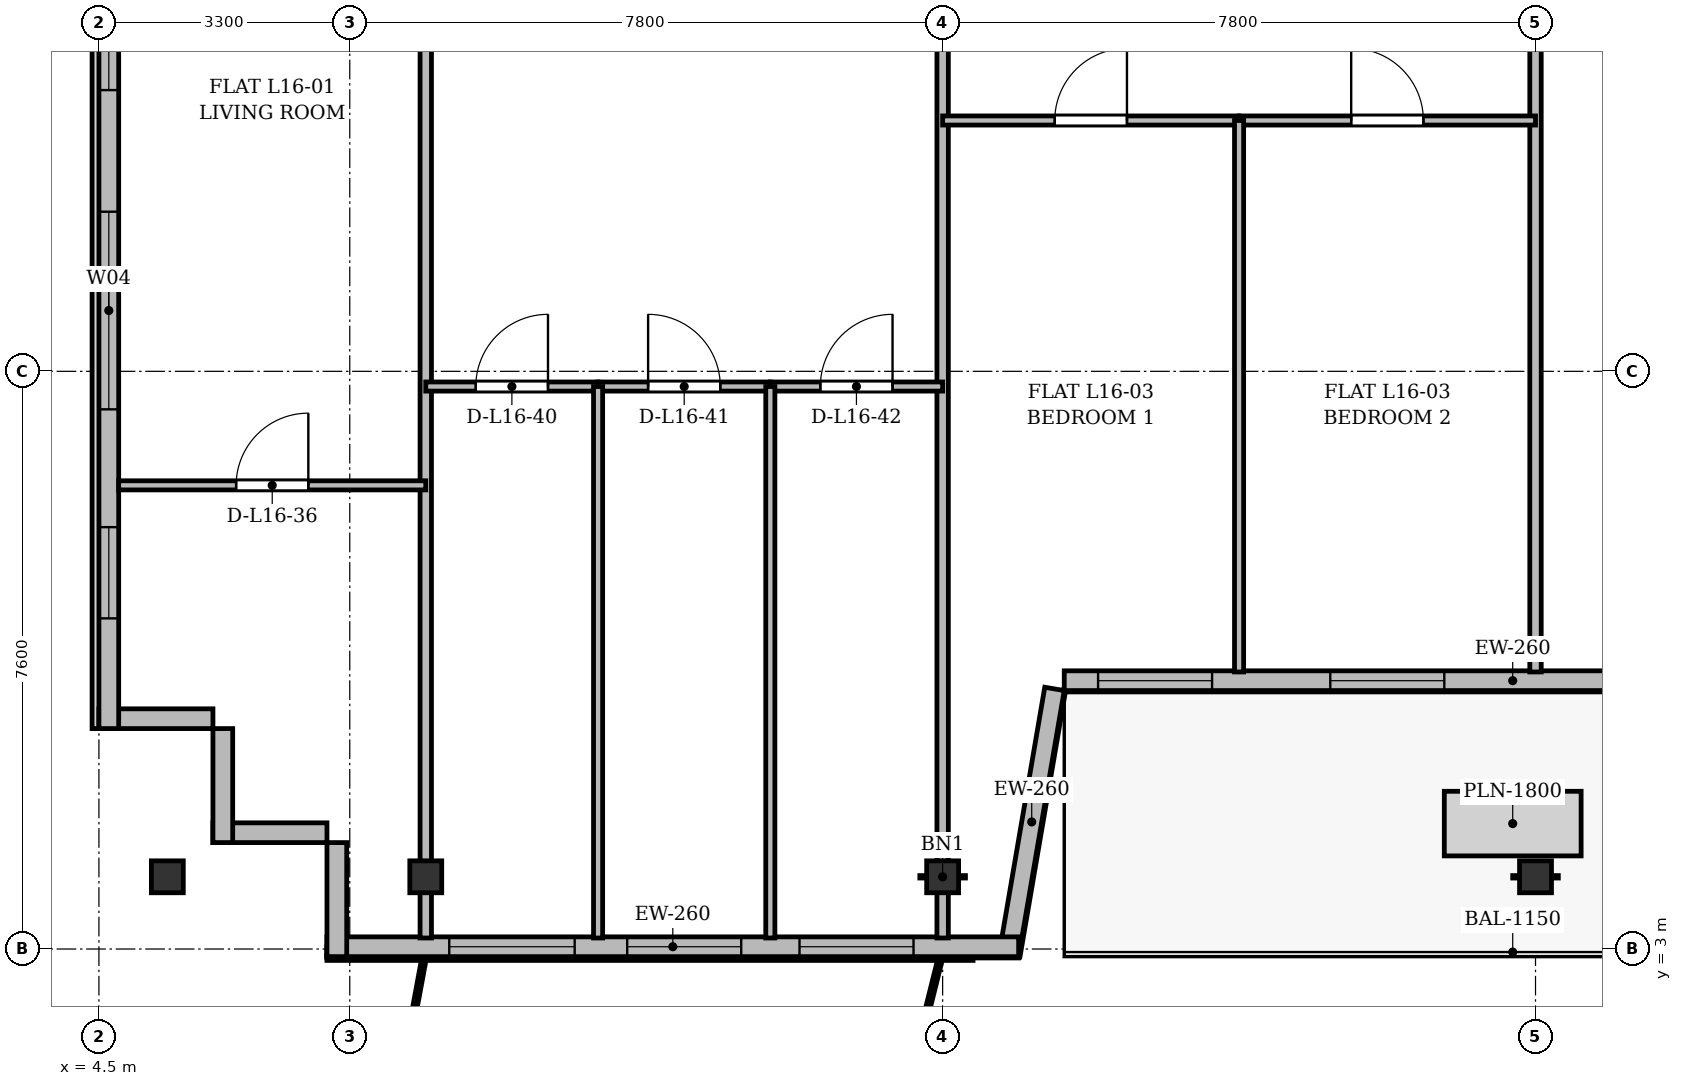
"""IFC4 building model, lengths in metres.
Left out: names, types, materials, properties, quantities, classifications, styles, units other than length and angle.
Written with IfcOpenShell. Run it as: python <this file> out.ifc"""

import sys

from ifc_helpers import new_model, si_unit, direction, frame, frame_2d, origin, origin_2d, place, context, subcontext, project, spatial, rectangle, i_section, extrude, source, transform, mapped, element, fill, save


model = new_model("IFC4")
c1 = context("Model", 3, precision=1e-05, world=origin(), true_north=direction((0.0, 1.0)))
c2 = subcontext(c1, "Body", "Model", "MODEL_VIEW")
j1 = project(units=[si_unit("LENGTHUNIT", "METRE"), si_unit("PLANEANGLEUNIT", "RADIAN")], contexts=[c1])
p1 = place(None, origin())
s1 = spatial("IfcSite", under=j1, at=p1, CompositionType="ELEMENT")
p2 = place(p1, origin())
s2 = spatial("IfcBuilding", under=s1, at=p2, CompositionType="ELEMENT")
p3 = place(p2, frame((0.0, 0.0, 63.1)))
s3 = spatial("IfcBuildingStorey", under=s2, at=p3, CompositionType="ELEMENT", Elevation=63.1)
m1 = source(origin(), c2, "Body", "SweptSolid", [
    extrude(i_section(OverallWidth=0.42, OverallDepth=0.42, WebThickness=0.026, FlangeThickness=0.04, at=origin_2d()), origin(), (0.0, 0.0, 1.0), 3.6),
])
for number, where, z_axis, x_axis in (
    (1, (5.4, 3.95, 0.0), (0.0, 0.0, 1.0), (1.0, 0.0, 0.0)),
    (2, (8.8, 3.95, 0.0), (0.0, 0.0, 1.0), (1.0, 0.0, 0.0)),
    (3, (15.6, 3.95, 0.0), (0.0, 0.0, 1.0), (1.0, 0.0, 0.0)),
    (4, (23.4, 3.95, 0.0), (0.0, 0.0, 1.0), (1.0, 0.0, 0.0)),
):
    element("IfcColumn", number, at=place(p3, frame(where, z_axis=z_axis, x_axis=x_axis)), inside=s3, PredefinedType="COLUMN", context=c2, shape_type="MappedRepresentation", body=[
        mapped(m1, transform((0.0, 0.0, 0.0), x_axis=(1.0, 0.0, 0.0), y_axis=(0.0, 1.0, 0.0), z_axis=(0.0, 0.0, 1.0), scale=1.0)),
    ])
for number, where, z_axis, x_axis in (
    (5, (7.5, 4.53, 0.0), (0.0, 0.0, 1.0), (-1.0, 0.0, 0.0)),
    (6, (6.13, 4.4, 0.0), (0.0, 0.0, 1.0), (0.0, 1.0, 0.0)),
):
    element("IfcWall", number, at=place(p3, frame(where, z_axis=z_axis, x_axis=x_axis)), inside=s3, PredefinedType="SOLIDWALL", context=c2, shape_type="SweptSolid", body=[
        extrude(rectangle(XDim=1.5, YDim=0.26, at=frame_2d((0.75, 0.0))), origin(), (0.0, 0.0, 1.0), 3.34),
    ])
p4 = place(p3, frame((6.0, 6.03, 0.0), z_axis=(0.0, 0.0, 1.0), x_axis=(-1.0, 0.0, 0.0)))
e7 = element("IfcWall", 7, at=p4, inside=s3, PredefinedType="SOLIDWALL", context=c2, shape_type="SweptSolid", body=[
    extrude(rectangle(XDim=1.5, YDim=0.26, at=frame_2d((0.75, 0.0))), origin(), (0.0, 0.0, 1.0), 2.752),
])
p5 = place(p3, frame((4.63, 5.9, 0.0), z_axis=(0.0, 0.0, 1.0), x_axis=(0.0, 1.0, 0.0)))
e8 = element("IfcWall", 8, at=p5, inside=s3, PredefinedType="SOLIDWALL", context=c2, shape_type="SweptSolid", body=[
    extrude(rectangle(XDim=39.6, YDim=0.26, at=frame_2d((19.8, 0.0))), origin(), (0.0, 0.0, 1.0), 3.34),
])
p6 = place(p5, frame((1.45, 0.0, 0.92)))
e9 = element("IfcOpeningElement", 9, at=p6, cuts=e8, PredefinedType="OPENING", context=c2, shape_type="SweptSolid", body=[
    extrude(rectangle(XDim=1.2, YDim=1.65, at=frame_2d((0.6, 0.825))), frame((0.0, 0.14, 0.0), z_axis=(0.0, -1.0, 0.0), x_axis=(1.0, 0.0, 0.0)), (0.0, 0.0, 1.0), 0.28),
])
p7 = place(p5, frame((4.2, 0.0, 0.92)))
e10 = element("IfcOpeningElement", 10, at=p7, cuts=e8, PredefinedType="OPENING", context=c2, shape_type="SweptSolid", body=[
    extrude(rectangle(XDim=2.6, YDim=1.9, at=frame_2d((1.3, 0.95))), frame((0.0, 0.14, 0.0), z_axis=(0.0, -1.0, 0.0), x_axis=(1.0, 0.0, 0.0)), (0.0, 0.0, 1.0), 0.28),
])
p8 = place(p5, frame((8.4, 0.0, 0.92)))
e11 = element("IfcOpeningElement", 11, at=p8, cuts=e8, PredefinedType="OPENING", context=c2, shape_type="SweptSolid", body=[
    extrude(rectangle(XDim=2.6, YDim=1.9, at=frame_2d((1.3, 0.95))), frame((0.0, 0.14, 0.0), z_axis=(0.0, -1.0, 0.0), x_axis=(1.0, 0.0, 0.0)), (0.0, 0.0, 1.0), 0.28),
])
p9 = place(p5, frame((33.9, 0.0, 0.92)))
e12 = element("IfcOpeningElement", 12, at=p9, cuts=e8, PredefinedType="OPENING", context=c2, shape_type="SweptSolid", body=[
    extrude(rectangle(XDim=1.2, YDim=1.65, at=frame_2d((0.6, 0.825))), frame((0.0, 0.14, 0.0), z_axis=(0.0, -1.0, 0.0), x_axis=(1.0, 0.0, 0.0)), (0.0, 0.0, 1.0), 0.28),
])
p10 = place(p5, frame((37.25, 0.0, 0.92)))
e13 = element("IfcOpeningElement", 13, at=p10, cuts=e8, PredefinedType="OPENING", context=c2, shape_type="SweptSolid", body=[
    extrude(rectangle(XDim=1.2, YDim=1.65, at=frame_2d((0.6, 0.825))), frame((0.0, 0.14, 0.0), z_axis=(0.0, -1.0, 0.0), x_axis=(1.0, 0.0, 0.0)), (0.0, 0.0, 1.0), 0.28),
])
p11 = place(p3, frame((29.0, 6.53, 0.0), z_axis=(0.0, 0.0, 1.0), x_axis=(-1.0, 0.0, 0.0)))
e14 = element("IfcWall", 14, at=p11, inside=s3, PredefinedType="SOLIDWALL", context=c2, shape_type="SweptSolid", body=[
    extrude(rectangle(XDim=11.8, YDim=0.26, at=frame_2d((5.9, 0.0))), origin(), (0.0, 0.0, 1.0), 2.752),
])
p12 = place(p11, frame((1.745, 0.0, 0.9)))
e15 = element("IfcOpeningElement", 15, at=p12, cuts=e14, PredefinedType="OPENING", context=c2, shape_type="SweptSolid", body=[
    extrude(rectangle(XDim=2.2, YDim=1.75, at=frame_2d((1.1, 0.875))), frame((0.0, 0.14, 0.0), z_axis=(0.0, -1.0, 0.0), x_axis=(1.0, 0.0, 0.0)), (0.0, 0.0, 1.0), 0.28),
])
p13 = place(p11, frame((6.8, 0.0, 0.9)))
e16 = element("IfcOpeningElement", 16, at=p13, cuts=e14, PredefinedType="OPENING", context=c2, shape_type="SweptSolid", body=[
    extrude(rectangle(XDim=1.5, YDim=1.75, at=frame_2d((0.75, 0.875))), frame((0.0, 0.14, 0.0), z_axis=(0.0, -1.0, 0.0), x_axis=(1.0, 0.0, 0.0)), (0.0, 0.0, 1.0), 0.28),
])
p14 = place(p11, frame((9.855, 0.0, 0.9)))
e17 = element("IfcOpeningElement", 17, at=p14, cuts=e14, PredefinedType="OPENING", context=c2, shape_type="SweptSolid", body=[
    extrude(rectangle(XDim=1.5, YDim=1.75, at=frame_2d((0.75, 0.875))), frame((0.0, 0.14, 0.0), z_axis=(0.0, -1.0, 0.0), x_axis=(1.0, 0.0, 0.0)), (0.0, 0.0, 1.0), 0.28),
])
p15 = place(p3, frame((17.072, 6.422, 0.0), z_axis=(0.0, 0.0, 1.0), x_axis=(-0.168990530437, -0.98561767467, 0.0)))
e18 = element("IfcWall", 18, at=p15, inside=s3, PredefinedType="SOLIDWALL", context=c2, shape_type="SweptSolid", body=[
    extrude(rectangle(XDim=3.551, YDim=0.26, at=frame_2d((1.775, 0.0))), origin(), (0.0, 0.0, 1.0), 2.69),
])
p16 = place(p3, frame((16.6, 3.03, 0.0), z_axis=(0.0, 0.0, 1.0), x_axis=(-1.0, 0.0, 0.0)))
e19 = element("IfcWall", 19, at=p16, inside=s3, PredefinedType="SOLIDWALL", context=c2, shape_type="SweptSolid", body=[
    extrude(rectangle(XDim=9.1, YDim=0.26, at=frame_2d((4.55, 0.0))), origin(), (0.0, 0.0, 1.0), 3.34),
])
p17 = place(p16, frame((1.383, 0.0, 0.9)))
e20 = element("IfcOpeningElement", 20, at=p17, cuts=e19, PredefinedType="OPENING", context=c2, shape_type="SweptSolid", body=[
    extrude(rectangle(XDim=1.5, YDim=1.75, at=frame_2d((0.75, 0.875))), frame((0.0, 0.14, 0.0), z_axis=(0.0, -1.0, 0.0), x_axis=(1.0, 0.0, 0.0)), (0.0, 0.0, 1.0), 0.28),
])
p18 = place(p16, frame((3.65, 0.0, 0.9)))
e21 = element("IfcOpeningElement", 21, at=p18, cuts=e19, PredefinedType="OPENING", context=c2, shape_type="SweptSolid", body=[
    extrude(rectangle(XDim=1.5, YDim=1.75, at=frame_2d((0.75, 0.875))), frame((0.0, 0.14, 0.0), z_axis=(0.0, -1.0, 0.0), x_axis=(1.0, 0.0, 0.0)), (0.0, 0.0, 1.0), 0.28),
])
p19 = place(p16, frame((5.841, 0.0, 0.9)))
e22 = element("IfcOpeningElement", 22, at=p19, cuts=e19, PredefinedType="OPENING", context=c2, shape_type="SweptSolid", body=[
    extrude(rectangle(XDim=1.65, YDim=1.85, at=frame_2d((0.825, 0.925))), frame((0.0, 0.14, 0.0), z_axis=(0.0, -1.0, 0.0), x_axis=(1.0, 0.0, 0.0)), (0.0, 0.0, 1.0), 0.28),
])
p20 = place(p3, frame((7.63, 2.9, 0.0), z_axis=(0.0, 0.0, 1.0), x_axis=(0.0, 1.0, 0.0)))
e23 = element("IfcWall", 23, at=p20, inside=s3, PredefinedType="SOLIDWALL", context=c2, shape_type="SweptSolid", body=[
    extrude(rectangle(XDim=1.5, YDim=0.26, at=frame_2d((0.75, 0.0))), origin(), (0.0, 0.0, 1.0), 2.69),
])
for number, where, z_axis, x_axis in (
    (24, (8.8, 3.145, 0.0), (0.0, 0.0, 1.0), (0.0, 1.0, 0.0)),
    (25, (15.6, 3.145, 0.0), (0.0, 0.0, 1.0), (0.0, 1.0, 0.0)),
):
    element("IfcWall", number, at=place(p3, frame(where, z_axis=z_axis, x_axis=x_axis)), inside=s3, PredefinedType="PARTITIONING", context=c2, shape_type="SweptSolid", body=[
        extrude(rectangle(XDim=24.455, YDim=0.15, at=frame_2d((12.228, 0.0))), origin(), (0.0, 0.0, 1.0), 2.752),
    ])
p21 = place(p3, frame((23.4, 6.645, 0.0), z_axis=(0.0, 0.0, 1.0), x_axis=(0.0, 1.0, 0.0)))
e26 = element("IfcWall", 26, at=p21, inside=s3, PredefinedType="PARTITIONING", context=c2, shape_type="SweptSolid", body=[
    extrude(rectangle(XDim=20.955, YDim=0.15, at=frame_2d((10.478, 0.0))), origin(), (0.0, 0.0, 1.0), 2.752),
])
p22 = place(p3, frame((4.76, 9.1, 0.0), z_axis=(0.0, 0.0, 1.0), x_axis=(1.0, 0.0, 0.0)))
e27 = element("IfcWall", 27, at=p22, inside=s3, PredefinedType="PARTITIONING", context=c2, shape_type="SweptSolid", body=[
    extrude(rectangle(XDim=4.04, YDim=0.12, at=frame_2d((2.02, 0.0))), origin(), (0.0, 0.0, 1.0), 2.752),
])
p23 = place(p22, frame((1.545, 0.0, 0.0)))
e28 = element("IfcOpeningElement", 28, at=p23, cuts=e27, PredefinedType="OPENING", context=c2, shape_type="SweptSolid", body=[
    extrude(rectangle(XDim=0.95, YDim=2.15, at=frame_2d((0.475, 1.075))), frame((0.0, 0.07, 0.0), z_axis=(0.0, -1.0, 0.0), x_axis=(1.0, 0.0, 0.0)), (0.0, 0.0, 1.0), 0.14),
])
p24 = place(p3, frame((8.8, 10.4, 0.0), z_axis=(0.0, 0.0, 1.0), x_axis=(1.0, 0.0, 0.0)))
e29 = element("IfcWall", 29, at=p24, inside=s3, PredefinedType="PARTITIONING", context=c2, shape_type="SweptSolid", body=[
    extrude(rectangle(XDim=2.267, YDim=0.12, at=frame_2d((1.133, 0.0))), origin(), (0.0, 0.0, 1.0), 2.752),
])
p25 = place(p24, frame((0.658, 0.0, 0.0)))
e30 = element("IfcOpeningElement", 30, at=p25, cuts=e29, PredefinedType="OPENING", context=c2, shape_type="SweptSolid", body=[
    extrude(rectangle(XDim=0.95, YDim=2.15, at=frame_2d((0.475, 1.075))), frame((0.0, 0.07, 0.0), z_axis=(0.0, -1.0, 0.0), x_axis=(1.0, 0.0, 0.0)), (0.0, 0.0, 1.0), 0.14),
])
p26 = place(p3, frame((11.067, 10.4, 0.0), z_axis=(0.0, 0.0, 1.0), x_axis=(1.0, 0.0, 0.0)))
e31 = element("IfcWall", 31, at=p26, inside=s3, PredefinedType="PARTITIONING", context=c2, shape_type="SweptSolid", body=[
    extrude(rectangle(XDim=2.266, YDim=0.12, at=frame_2d((1.133, 0.0))), origin(), (0.0, 0.0, 1.0), 3.34),
])
p27 = place(p26, frame((0.658, 0.0, 0.0)))
e32 = element("IfcOpeningElement", 32, at=p27, cuts=e31, PredefinedType="OPENING", context=c2, shape_type="SweptSolid", body=[
    extrude(rectangle(XDim=0.95, YDim=2.15, at=frame_2d((0.475, 1.075))), frame((0.0, 0.07, 0.0), z_axis=(0.0, -1.0, 0.0), x_axis=(1.0, 0.0, 0.0)), (0.0, 0.0, 1.0), 0.14),
])
p28 = place(p3, frame((11.067, 3.145, 0.0), z_axis=(0.0, 0.0, 1.0), x_axis=(0.0, 1.0, 0.0)))
e33 = element("IfcWall", 33, at=p28, inside=s3, PredefinedType="PARTITIONING", context=c2, shape_type="SweptSolid", body=[
    extrude(rectangle(XDim=7.255, YDim=0.12, at=frame_2d((3.627, 0.0))), origin(), (0.0, 0.0, 1.0), 2.69),
])
p29 = place(p3, frame((13.333, 10.4, 0.0), z_axis=(0.0, 0.0, 1.0), x_axis=(1.0, 0.0, 0.0)))
e34 = element("IfcWall", 34, at=p29, inside=s3, PredefinedType="PARTITIONING", context=c2, shape_type="SweptSolid", body=[
    extrude(rectangle(XDim=2.267, YDim=0.12, at=frame_2d((1.134, 0.0))), origin(), (0.0, 0.0, 1.0), 2.752),
])
p30 = place(p29, frame((0.658, 0.0, 0.0)))
e35 = element("IfcOpeningElement", 35, at=p30, cuts=e34, PredefinedType="OPENING", context=c2, shape_type="SweptSolid", body=[
    extrude(rectangle(XDim=0.95, YDim=2.15, at=frame_2d((0.475, 1.075))), frame((0.0, 0.07, 0.0), z_axis=(0.0, -1.0, 0.0), x_axis=(1.0, 0.0, 0.0)), (0.0, 0.0, 1.0), 0.14),
])
p31 = place(p3, frame((13.333, 3.145, 0.0), z_axis=(0.0, 0.0, 1.0), x_axis=(0.0, 1.0, 0.0)))
e36 = element("IfcWall", 36, at=p31, inside=s3, PredefinedType="PARTITIONING", context=c2, shape_type="SweptSolid", body=[
    extrude(rectangle(XDim=7.255, YDim=0.12, at=frame_2d((3.627, 0.0))), origin(), (0.0, 0.0, 1.0), 2.69),
])
p32 = place(p3, frame((15.6, 13.9, 0.0), z_axis=(0.0, 0.0, 1.0), x_axis=(1.0, 0.0, 0.0)))
e37 = element("IfcWall", 37, at=p32, inside=s3, PredefinedType="PARTITIONING", context=c2, shape_type="SweptSolid", body=[
    extrude(rectangle(XDim=3.9, YDim=0.12, at=frame_2d((1.95, 0.0))), origin(), (0.0, 0.0, 1.0), 2.752),
])
p33 = place(p32, frame((1.475, 0.0, 0.0)))
e38 = element("IfcOpeningElement", 38, at=p33, cuts=e37, PredefinedType="OPENING", context=c2, shape_type="SweptSolid", body=[
    extrude(rectangle(XDim=0.95, YDim=2.15, at=frame_2d((0.475, 1.075))), frame((0.0, 0.07, 0.0), z_axis=(0.0, -1.0, 0.0), x_axis=(1.0, 0.0, 0.0)), (0.0, 0.0, 1.0), 0.14),
])
p34 = place(p3, frame((19.5, 13.9, 0.0), z_axis=(0.0, 0.0, 1.0), x_axis=(1.0, 0.0, 0.0)))
e39 = element("IfcWall", 39, at=p34, inside=s3, PredefinedType="PARTITIONING", context=c2, shape_type="SweptSolid", body=[
    extrude(rectangle(XDim=3.9, YDim=0.12, at=frame_2d((1.95, 0.0))), origin(), (0.0, 0.0, 1.0), 2.752),
])
p35 = place(p34, frame((1.475, 0.0, 0.0)))
e40 = element("IfcOpeningElement", 40, at=p35, cuts=e39, PredefinedType="OPENING", context=c2, shape_type="SweptSolid", body=[
    extrude(rectangle(XDim=0.95, YDim=2.15, at=frame_2d((0.475, 1.075))), frame((0.0, 0.07, 0.0), z_axis=(0.0, -1.0, 0.0), x_axis=(1.0, 0.0, 0.0)), (0.0, 0.0, 1.0), 0.14),
])
p36 = place(p3, frame((19.5, 6.645, 0.0), z_axis=(0.0, 0.0, 1.0), x_axis=(0.0, 1.0, 0.0)))
e41 = element("IfcWall", 41, at=p36, inside=s3, PredefinedType="PARTITIONING", context=c2, shape_type="SweptSolid", body=[
    extrude(rectangle(XDim=7.255, YDim=0.12, at=frame_2d((3.627, 0.0))), origin(), (0.0, 0.0, 1.0), 3.34),
])
m2 = source(origin(), c2, "Body", "SweptSolid", [
    extrude(rectangle(XDim=1.2, YDim=1.65, at=frame_2d((0.6, 0.825))), frame((0.0, 0.03, 0.0), z_axis=(0.0, -1.0, 0.0), x_axis=(1.0, 0.0, 0.0)), (0.0, 0.0, 1.0), 0.06),
])
p37 = place(p6, origin())
e42 = element("IfcWindow", 42, at=p37, inside=s3, PartitioningType="SINGLE_PANEL", PredefinedType="WINDOW", context=c2, shape_type="MappedRepresentation", body=[
    mapped(m2, transform((0.0, 0.0, 0.0), x_axis=(1.0, 0.0, 0.0), y_axis=(0.0, 1.0, 0.0), z_axis=(0.0, 0.0, 1.0), scale=1.0)),
])
fill(e9, e42)
m3 = source(origin(), c2, "Body", "SweptSolid", [
    extrude(rectangle(XDim=2.6, YDim=1.9, at=frame_2d((1.3, 0.95))), frame((0.0, 0.03, 0.0), z_axis=(0.0, -1.0, 0.0), x_axis=(1.0, 0.0, 0.0)), (0.0, 0.0, 1.0), 0.06),
])
p38 = place(p7, origin())
e43 = element("IfcWindow", 43, at=p38, inside=s3, PartitioningType="SINGLE_PANEL", PredefinedType="WINDOW", context=c2, shape_type="MappedRepresentation", body=[
    mapped(m3, transform((0.0, 0.0, 0.0), x_axis=(1.0, 0.0, 0.0), y_axis=(0.0, 1.0, 0.0), z_axis=(0.0, 0.0, 1.0), scale=1.0)),
])
fill(e10, e43)
p39 = place(p8, origin())
e44 = element("IfcWindow", 44, at=p39, inside=s3, PartitioningType="SINGLE_PANEL", PredefinedType="WINDOW", context=c2, shape_type="MappedRepresentation", body=[
    mapped(m3, transform((0.0, 0.0, 0.0), x_axis=(1.0, 0.0, 0.0), y_axis=(0.0, 1.0, 0.0), z_axis=(0.0, 0.0, 1.0), scale=1.0)),
])
fill(e11, e44)
m4 = source(origin(), c2, "Body", "SweptSolid", [
    extrude(rectangle(XDim=1.5, YDim=1.75, at=frame_2d((0.75, 0.875))), frame((0.0, 0.03, 0.0), z_axis=(0.0, -1.0, 0.0), x_axis=(1.0, 0.0, 0.0)), (0.0, 0.0, 1.0), 0.06),
])
p40 = place(p13, origin())
e45 = element("IfcWindow", 45, at=p40, inside=s3, PartitioningType="SINGLE_PANEL", PredefinedType="WINDOW", context=c2, shape_type="MappedRepresentation", body=[
    mapped(m4, transform((0.0, 0.0, 0.0), x_axis=(1.0, 0.0, 0.0), y_axis=(0.0, 1.0, 0.0), z_axis=(0.0, 0.0, 1.0), scale=1.0)),
])
fill(e16, e45)
p41 = place(p14, origin())
e46 = element("IfcWindow", 46, at=p41, inside=s3, PartitioningType="SINGLE_PANEL", PredefinedType="WINDOW", context=c2, shape_type="MappedRepresentation", body=[
    mapped(m4, transform((0.0, 0.0, 0.0), x_axis=(1.0, 0.0, 0.0), y_axis=(0.0, 1.0, 0.0), z_axis=(0.0, 0.0, 1.0), scale=1.0)),
])
fill(e17, e46)
p42 = place(p17, origin())
e47 = element("IfcWindow", 47, at=p42, inside=s3, PartitioningType="SINGLE_PANEL", PredefinedType="WINDOW", context=c2, shape_type="MappedRepresentation", body=[
    mapped(m4, transform((0.0, 0.0, 0.0), x_axis=(1.0, 0.0, 0.0), y_axis=(0.0, 1.0, 0.0), z_axis=(0.0, 0.0, 1.0), scale=1.0)),
])
fill(e20, e47)
p43 = place(p18, origin())
e48 = element("IfcWindow", 48, at=p43, inside=s3, PartitioningType="SINGLE_PANEL", PredefinedType="WINDOW", context=c2, shape_type="MappedRepresentation", body=[
    mapped(m4, transform((0.0, 0.0, 0.0), x_axis=(1.0, 0.0, 0.0), y_axis=(0.0, 1.0, 0.0), z_axis=(0.0, 0.0, 1.0), scale=1.0)),
])
fill(e21, e48)
m5 = source(origin(), c2, "Body", "SweptSolid", [
    extrude(rectangle(XDim=1.65, YDim=1.85, at=frame_2d((0.825, 0.925))), frame((0.0, 0.03, 0.0), z_axis=(0.0, -1.0, 0.0), x_axis=(1.0, 0.0, 0.0)), (0.0, 0.0, 1.0), 0.06),
])
p44 = place(p19, origin())
e49 = element("IfcWindow", 49, at=p44, inside=s3, PartitioningType="SINGLE_PANEL", PredefinedType="WINDOW", context=c2, shape_type="MappedRepresentation", body=[
    mapped(m5, transform((0.0, 0.0, 0.0), x_axis=(1.0, 0.0, 0.0), y_axis=(0.0, 1.0, 0.0), z_axis=(0.0, 0.0, 1.0), scale=1.0)),
])
fill(e22, e49)
m6 = source(origin(), c2, "Body", "SweptSolid", [
    extrude(rectangle(XDim=0.95, YDim=2.15, at=frame_2d((0.475, 1.075))), frame((0.0, 0.025, 0.0), z_axis=(0.0, -1.0, 0.0), x_axis=(1.0, 0.0, 0.0)), (0.0, 0.0, 1.0), 0.05),
])
p45 = place(p23, origin())
e50 = element("IfcDoor", 50, at=p45, inside=s3, OperationType="SINGLE_SWING_RIGHT", PredefinedType="DOOR", context=c2, shape_type="MappedRepresentation", body=[
    mapped(m6, transform((0.0, 0.0, 0.0), x_axis=(1.0, 0.0, 0.0), y_axis=(0.0, 1.0, 0.0), z_axis=(0.0, 0.0, 1.0), scale=1.0)),
])
fill(e28, e50)
p46 = place(p25, origin())
e51 = element("IfcDoor", 51, at=p46, inside=s3, OperationType="SINGLE_SWING_RIGHT", PredefinedType="DOOR", context=c2, shape_type="MappedRepresentation", body=[
    mapped(m6, transform((0.0, 0.0, 0.0), x_axis=(1.0, 0.0, 0.0), y_axis=(0.0, 1.0, 0.0), z_axis=(0.0, 0.0, 1.0), scale=1.0)),
])
fill(e30, e51)
p47 = place(p27, origin())
e52 = element("IfcDoor", 52, at=p47, inside=s3, OperationType="SINGLE_SWING_LEFT", PredefinedType="DOOR", context=c2, shape_type="MappedRepresentation", body=[
    mapped(m6, transform((0.0, 0.0, 0.0), x_axis=(1.0, 0.0, 0.0), y_axis=(0.0, 1.0, 0.0), z_axis=(0.0, 0.0, 1.0), scale=1.0)),
])
fill(e32, e52)
p48 = place(p30, origin())
e53 = element("IfcDoor", 53, at=p48, inside=s3, OperationType="SINGLE_SWING_RIGHT", PredefinedType="DOOR", context=c2, shape_type="MappedRepresentation", body=[
    mapped(m6, transform((0.0, 0.0, 0.0), x_axis=(1.0, 0.0, 0.0), y_axis=(0.0, 1.0, 0.0), z_axis=(0.0, 0.0, 1.0), scale=1.0)),
])
fill(e35, e53)
p49 = place(p33, origin())
e54 = element("IfcDoor", 54, at=p49, inside=s3, OperationType="SINGLE_SWING_RIGHT", PredefinedType="DOOR", context=c2, shape_type="MappedRepresentation", body=[
    mapped(m6, transform((0.0, 0.0, 0.0), x_axis=(1.0, 0.0, 0.0), y_axis=(0.0, 1.0, 0.0), z_axis=(0.0, 0.0, 1.0), scale=1.0)),
])
fill(e38, e54)
p50 = place(p35, origin())
e55 = element("IfcDoor", 55, at=p50, inside=s3, OperationType="SINGLE_SWING_LEFT", PredefinedType="DOOR", context=c2, shape_type="MappedRepresentation", body=[
    mapped(m6, transform((0.0, 0.0, 0.0), x_axis=(1.0, 0.0, 0.0), y_axis=(0.0, 1.0, 0.0), z_axis=(0.0, 0.0, 1.0), scale=1.0)),
])
fill(e40, e55)
save(model, sys.argv[1])
